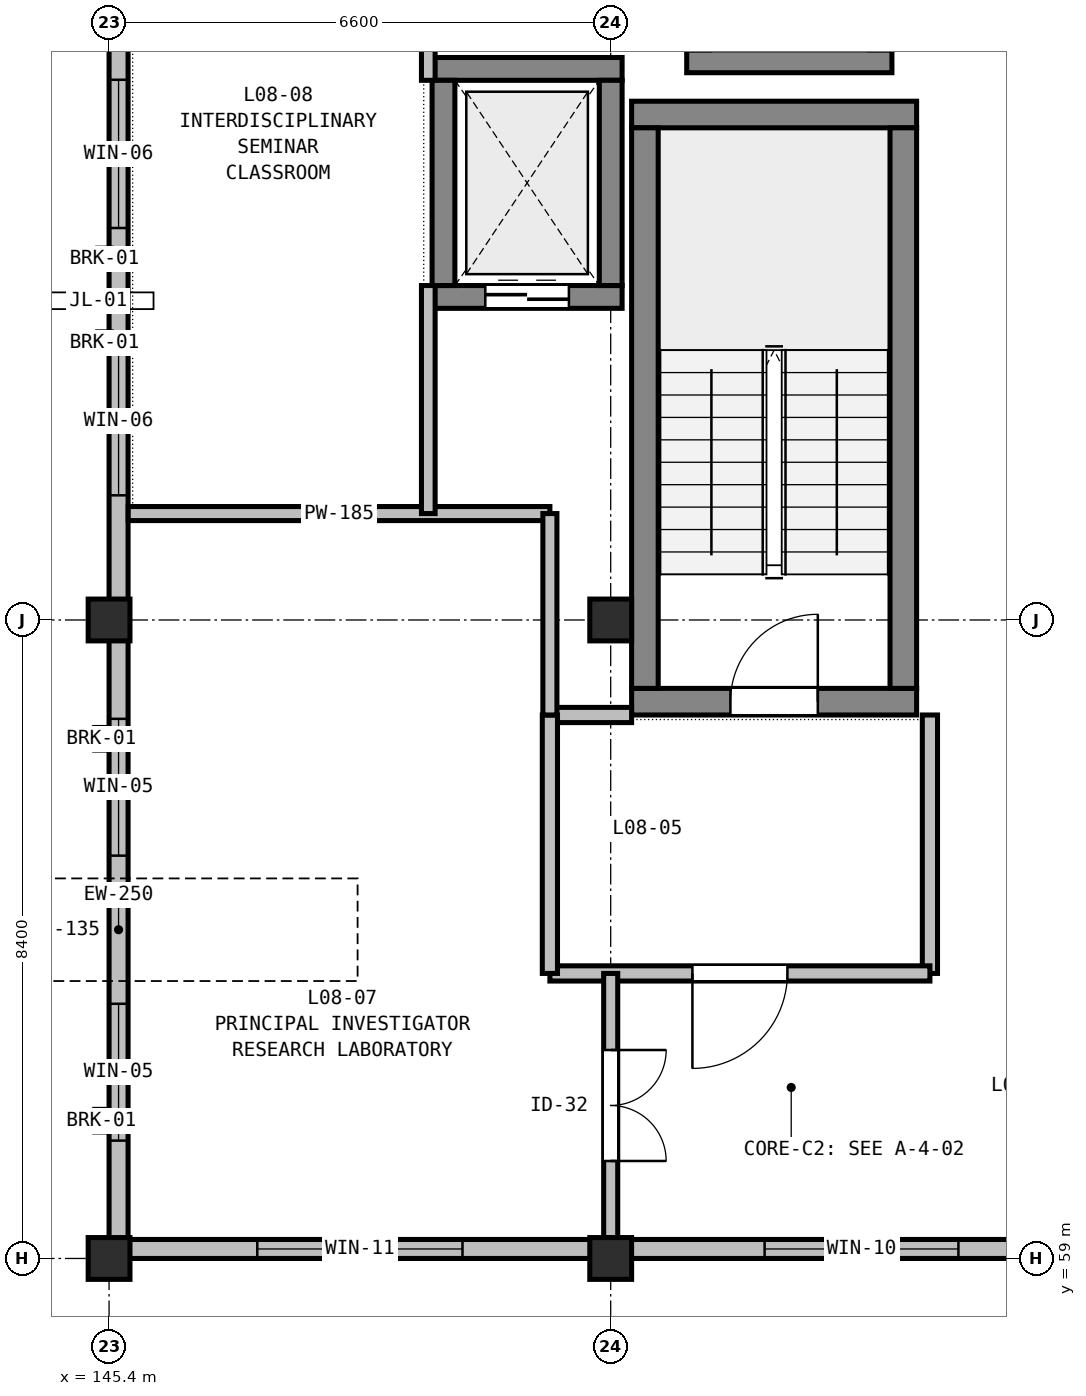
"""IFC4 building model, lengths in metres.
Left out: names, types, materials, properties, quantities, classifications, styles, units other than length and angle.
Written with IfcOpenShell. Run it as: python <this file> out.ifc"""

import sys

from ifc_helpers import new_model, si_unit, direction, frame, frame_2d, origin, origin_2d, place, context, subcontext, project, spatial, rectangle, extrude, element, fill, save


model = new_model("IFC4")
c1 = context("Model", 3, precision=1e-05, world=origin(), true_north=direction((0.0, 1.0)))
c2 = subcontext(c1, "Body", "Model", "MODEL_VIEW")
j1 = project(units=[si_unit("LENGTHUNIT", "METRE"), si_unit("PLANEANGLEUNIT", "RADIAN")], contexts=[c1])
p1 = place(None, origin())
s1 = spatial("IfcSite", under=j1, at=p1, CompositionType="ELEMENT")
p2 = place(p1, origin())
s2 = spatial("IfcBuilding", under=s1, at=p2, CompositionType="ELEMENT")
p3 = place(p2, frame((0.0, 0.0, 36.6)))
s3 = spatial("IfcBuildingStorey", under=s2, at=p3, CompositionType="ELEMENT", Elevation=36.6)
for number, where, z_axis, x_axis in (
    (1, (145.4, 59.0, 0.0), (0.0, 0.0, 1.0), (1.0, 0.0, 0.0)),
    (2, (145.4, 67.4, 0.0), (0.0, 0.0, 1.0), (1.0, 0.0, 0.0)),
    (3, (152.0, 59.0, 0.0), (0.0, 0.0, 1.0), (1.0, 0.0, 0.0)),
    (4, (152.0, 67.4, 0.0), (0.0, 0.0, 1.0), (1.0, 0.0, 0.0)),
):
    element("IfcColumn", number, at=place(p3, frame(where, z_axis=z_axis, x_axis=x_axis)), inside=s3, PredefinedType="COLUMN", context=c2, shape_type="SweptSolid", body=[
        extrude(rectangle(XDim=0.55, YDim=0.55, at=origin_2d()), origin(), (0.0, 0.0, 1.0), 3.9),
    ])
p4 = place(p3, frame((152.275, 66.325, 0.0), z_axis=(0.0, 0.0, 1.0), x_axis=(1.0, 0.0, 0.0)))
e5 = element("IfcWall", 5, at=p4, inside=s3, PredefinedType="SHEAR", context=c2, shape_type="SweptSolid", body=[
    extrude(rectangle(XDim=3.75, YDim=0.35, at=frame_2d((1.875, 0.0))), origin(), (0.0, 0.0, 1.0), 3.9),
])
p5 = place(p4, frame((1.3, 0.0, 0.0)))
e6 = element("IfcOpeningElement", 6, at=p5, cuts=e5, PredefinedType="OPENING", context=c2, shape_type="SweptSolid", body=[
    extrude(rectangle(XDim=1.15, YDim=2.15, at=frame_2d((0.575, 1.075))), frame((0.0, 0.185, 0.0), z_axis=(0.0, -1.0, 0.0), x_axis=(1.0, 0.0, 0.0)), (0.0, 0.0, 1.0), 0.37),
])
p6 = place(p3, frame((152.275, 74.05, 0.0), z_axis=(0.0, 0.0, 1.0), x_axis=(1.0, 0.0, 0.0)))
e7 = element("IfcWall", 7, at=p6, inside=s3, PredefinedType="SHEAR", context=c2, shape_type="SweptSolid", body=[
    extrude(rectangle(XDim=3.75, YDim=0.35, at=frame_2d((1.875, 0.0))), origin(), (0.0, 0.0, 1.0), 3.9),
])
for number, where, z_axis, x_axis in (
    (8, (152.45, 66.5, 0.0), (0.0, 0.0, 1.0), (0.0, 1.0, 0.0)),
    (9, (155.85, 66.5, 0.0), (0.0, 0.0, 1.0), (0.0, 1.0, 0.0)),
):
    element("IfcWall", number, at=place(p3, frame(where, z_axis=z_axis, x_axis=x_axis)), inside=s3, PredefinedType="SHEAR", context=c2, shape_type="SweptSolid", body=[
        extrude(rectangle(XDim=7.375, YDim=0.35, at=frame_2d((3.688, 0.0))), origin(), (0.0, 0.0, 1.0), 3.9),
    ])
p7 = place(p3, frame((149.65, 71.65, 0.0), z_axis=(0.0, 0.0, 1.0), x_axis=(1.0, 0.0, 0.0)))
e10 = element("IfcWall", 10, at=p7, inside=s3, PredefinedType="SHEAR", context=c2, shape_type="SweptSolid", body=[
    extrude(rectangle(XDim=2.5, YDim=0.3, at=frame_2d((1.25, 0.0))), origin(), (0.0, 0.0, 1.0), 3.9),
])
p8 = place(p7, frame((0.7, 0.0, 0.0)))
e11 = element("IfcOpeningElement", 11, at=p8, cuts=e10, PredefinedType="OPENING", context=c2, shape_type="SweptSolid", body=[
    extrude(rectangle(XDim=1.1, YDim=2.1, at=frame_2d((0.55, 1.05))), frame((0.0, 0.16, 0.0), z_axis=(0.0, -1.0, 0.0), x_axis=(1.0, 0.0, 0.0)), (0.0, 0.0, 1.0), 0.32),
])
p9 = place(p3, frame((149.65, 74.65, 0.0), z_axis=(0.0, 0.0, 1.0), x_axis=(1.0, 0.0, 0.0)))
e12 = element("IfcWall", 12, at=p9, inside=s3, PredefinedType="SHEAR", context=c2, shape_type="SweptSolid", body=[
    extrude(rectangle(XDim=2.5, YDim=0.3, at=frame_2d((1.25, 0.0))), origin(), (0.0, 0.0, 1.0), 3.9),
])
for number, where, z_axis, x_axis in (
    (13, (149.8, 71.8, 0.0), (0.0, 0.0, 1.0), (0.0, 1.0, 0.0)),
    (14, (152.0, 71.8, 0.0), (0.0, 0.0, 1.0), (0.0, 1.0, 0.0)),
    (15, (153.0, 74.75, 0.0), (0.0, 0.0, 1.0), (1.0, 0.0, 0.0)),
):
    element("IfcWall", number, at=place(p3, frame(where, z_axis=z_axis, x_axis=x_axis)), inside=s3, PredefinedType="SHEAR", context=c2, shape_type="SweptSolid", body=[
        extrude(rectangle(XDim=2.7, YDim=0.3, at=frame_2d((1.35, 0.0))), origin(), (0.0, 0.0, 1.0), 3.9),
    ])
p10 = place(p3, frame((145.525, 59.25, 0.0), z_axis=(0.0, 0.0, 1.0), x_axis=(0.0, 1.0, 0.0)))
e16 = element("IfcWall", 16, at=p10, inside=s3, PredefinedType="STANDARD", context=c2, shape_type="SweptSolid", body=[
    extrude(rectangle(XDim=8.15, YDim=0.25, at=frame_2d((4.075, 0.0))), origin(), (0.0, 0.0, 1.0), 3.285),
])
p11 = place(p10, frame((1.301, 0.0, 0.9)))
e17 = element("IfcOpeningElement", 17, at=p11, cuts=e16, PredefinedType="OPENING", context=c2, shape_type="SweptSolid", body=[
    extrude(rectangle(XDim=1.8, YDim=2.1, at=frame_2d((0.9, 1.05))), frame((0.0, 0.135, 0.0), z_axis=(0.0, -1.0, 0.0), x_axis=(1.0, 0.0, 0.0)), (0.0, 0.0, 1.0), 0.27),
])
p12 = place(p10, frame((5.05, 0.0, 0.9)))
e18 = element("IfcOpeningElement", 18, at=p12, cuts=e16, PredefinedType="OPENING", context=c2, shape_type="SweptSolid", body=[
    extrude(rectangle(XDim=1.8, YDim=2.1, at=frame_2d((0.9, 1.05))), frame((0.0, 0.135, 0.0), z_axis=(0.0, -1.0, 0.0), x_axis=(1.0, 0.0, 0.0)), (0.0, 0.0, 1.0), 0.27),
])
p13 = place(p3, frame((145.525, 67.4, 0.0), z_axis=(0.0, 0.0, 1.0), x_axis=(0.0, 1.0, 0.0)))
e19 = element("IfcWall", 19, at=p13, inside=s3, PredefinedType="STANDARD", context=c2, shape_type="SweptSolid", body=[
    extrude(rectangle(XDim=8.4, YDim=0.25, at=frame_2d((4.2, 0.0))), origin(), (0.0, 0.0, 1.0), 3.285),
])
p14 = place(p13, frame((1.64, 0.0, 0.9)))
e20 = element("IfcOpeningElement", 20, at=p14, cuts=e19, PredefinedType="OPENING", context=c2, shape_type="SweptSolid", body=[
    extrude(rectangle(XDim=1.95, YDim=2.1, at=frame_2d((0.975, 1.05))), frame((0.0, 0.135, 0.0), z_axis=(0.0, -1.0, 0.0), x_axis=(1.0, 0.0, 0.0)), (0.0, 0.0, 1.0), 0.27),
])
p15 = place(p13, frame((5.157, 0.0, 0.9)))
e21 = element("IfcOpeningElement", 21, at=p15, cuts=e19, PredefinedType="OPENING", context=c2, shape_type="SweptSolid", body=[
    extrude(rectangle(XDim=1.95, YDim=2.1, at=frame_2d((0.975, 1.05))), frame((0.0, 0.135, 0.0), z_axis=(0.0, -1.0, 0.0), x_axis=(1.0, 0.0, 0.0)), (0.0, 0.0, 1.0), 0.27),
])
p16 = place(p3, frame((158.6, 59.125, 0.0), z_axis=(0.0, 0.0, 1.0), x_axis=(-1.0, 0.0, 0.0)))
e22 = element("IfcWall", 22, at=p16, inside=s3, PredefinedType="STANDARD", context=c2, shape_type="SweptSolid", body=[
    extrude(rectangle(XDim=6.6, YDim=0.25, at=frame_2d((3.3, 0.0))), origin(), (0.0, 0.0, 1.0), 3.185),
])
p17 = place(p16, frame((2.025, 0.0, 0.75)))
e23 = element("IfcOpeningElement", 23, at=p17, cuts=e22, PredefinedType="OPENING", context=c2, shape_type="SweptSolid", body=[
    extrude(rectangle(XDim=2.55, YDim=2.15, at=frame_2d((1.275, 1.075))), frame((0.0, 0.135, 0.0), z_axis=(0.0, -1.0, 0.0), x_axis=(1.0, 0.0, 0.0)), (0.0, 0.0, 1.0), 0.27),
])
p18 = place(p3, frame((152.0, 59.125, 0.0), z_axis=(0.0, 0.0, 1.0), x_axis=(-1.0, 0.0, 0.0)))
e24 = element("IfcWall", 24, at=p18, inside=s3, PredefinedType="STANDARD", context=c2, shape_type="SweptSolid", body=[
    extrude(rectangle(XDim=6.6, YDim=0.25, at=frame_2d((3.3, 0.0))), origin(), (0.0, 0.0, 1.0), 3.185),
])
p19 = place(p18, frame((1.95, 0.0, 0.75)))
e25 = element("IfcOpeningElement", 25, at=p19, cuts=e24, PredefinedType="OPENING", context=c2, shape_type="SweptSolid", body=[
    extrude(rectangle(XDim=2.7, YDim=2.2, at=frame_2d((1.35, 1.1))), frame((0.0, 0.135, 0.0), z_axis=(0.0, -1.0, 0.0), x_axis=(1.0, 0.0, 0.0)), (0.0, 0.0, 1.0), 0.27),
])
p20 = place(p3, frame((151.2, 66.15, 0.0), z_axis=(0.0, 0.0, 1.0), x_axis=(1.0, 0.0, 0.0)))
e26 = element("IfcWall", 26, at=p20, inside=s3, PredefinedType="PARTITIONING", context=c2, shape_type="SweptSolid", body=[
    extrude(rectangle(XDim=1.075, YDim=0.2, at=frame_2d((0.538, 0.0))), origin(), (0.0, 0.0, 1.0), 3.185),
])
p21 = place(p3, frame((156.2, 66.15, 0.0), z_axis=(0.0, 0.0, 1.0), x_axis=(0.0, -1.0, 0.0)))
e27 = element("IfcWall", 27, at=p21, inside=s3, PredefinedType="PARTITIONING", context=c2, shape_type="SweptSolid", body=[
    extrude(rectangle(XDim=3.4, YDim=0.2, at=frame_2d((1.7, 0.0))), origin(), (0.0, 0.0, 1.0), 3.635),
])
p22 = place(p3, frame((156.2, 62.75, 0.0), z_axis=(0.0, 0.0, 1.0), x_axis=(-1.0, 0.0, 0.0)))
e28 = element("IfcWall", 28, at=p22, inside=s3, PredefinedType="PARTITIONING", context=c2, shape_type="SweptSolid", body=[
    extrude(rectangle(XDim=5.0, YDim=0.2, at=frame_2d((2.5, 0.0))), origin(), (0.0, 0.0, 1.0), 3.185),
])
p23 = place(p22, frame((1.875, 0.0, 0.0)))
e29 = element("IfcOpeningElement", 29, at=p23, cuts=e28, PredefinedType="OPENING", context=c2, shape_type="SweptSolid", body=[
    extrude(rectangle(XDim=1.25, YDim=2.15, at=frame_2d((0.625, 1.075))), frame((0.0, 0.11, 0.0), z_axis=(0.0, -1.0, 0.0), x_axis=(1.0, 0.0, 0.0)), (0.0, 0.0, 1.0), 0.22),
])
p24 = place(p3, frame((151.2, 62.75, 0.0), z_axis=(0.0, 0.0, 1.0), x_axis=(0.0, 1.0, 0.0)))
e30 = element("IfcWall", 30, at=p24, inside=s3, PredefinedType="PARTITIONING", context=c2, shape_type="SweptSolid", body=[
    extrude(rectangle(XDim=3.4, YDim=0.2, at=frame_2d((1.7, 0.0))), origin(), (0.0, 0.0, 1.0), 3.635),
])
p25 = place(p3, frame((145.652, 68.8, 0.0), z_axis=(0.0, 0.0, 1.0), x_axis=(1.0, 0.0, 0.0)))
e31 = element("IfcWall", 31, at=p25, inside=s3, PredefinedType="PARTITIONING", context=c2, shape_type="SweptSolid", body=[
    extrude(rectangle(XDim=5.548, YDim=0.185, at=frame_2d((2.774, 0.0))), origin(), (0.0, 0.0, 1.0), 3.335),
])
p26 = place(p3, frame((151.2, 68.8, 0.0), z_axis=(0.0, 0.0, 1.0), x_axis=(0.0, -1.0, 0.0)))
e32 = element("IfcWall", 32, at=p26, inside=s3, PredefinedType="PARTITIONING", context=c2, shape_type="SweptSolid", body=[
    extrude(rectangle(XDim=2.65, YDim=0.185, at=frame_2d((1.325, 0.0))), origin(), (0.0, 0.0, 1.0), 3.285),
])
p27 = place(p3, frame((152.0, 62.75, 0.0), z_axis=(0.0, 0.0, 1.0), x_axis=(0.0, -1.0, 0.0)))
e33 = element("IfcWall", 33, at=p27, inside=s3, PredefinedType="PARTITIONING", context=c2, shape_type="SweptSolid", body=[
    extrude(rectangle(XDim=3.475, YDim=0.185, at=frame_2d((1.738, 0.0))), origin(), (0.0, 0.0, 1.0), 3.185),
])
p28 = place(p27, frame((1.008, 0.0, 0.0)))
e34 = element("IfcOpeningElement", 34, at=p28, cuts=e33, PredefinedType="OPENING", context=c2, shape_type="SweptSolid", body=[
    extrude(rectangle(XDim=1.46, YDim=2.2, at=frame_2d((0.73, 1.1))), frame((0.0, 0.103, 0.0), z_axis=(0.0, -1.0, 0.0), x_axis=(1.0, 0.0, 0.0)), (0.0, 0.0, 1.0), 0.205),
])
p29 = place(p3, frame((149.6, 78.0, 0.0), z_axis=(0.0, 0.0, 1.0), x_axis=(0.0, -1.0, 0.0)))
e35 = element("IfcWall", 35, at=p29, inside=s3, PredefinedType="PARTITIONING", context=c2, shape_type="SweptSolid", body=[
    extrude(rectangle(XDim=3.5, YDim=0.18, at=frame_2d((1.75, 0.0))), origin(), (0.0, 0.0, 1.0), 3.285),
])
p30 = place(p3, frame((149.6, 71.8, 0.0), z_axis=(0.0, 0.0, 1.0), x_axis=(0.0, -1.0, 0.0)))
e36 = element("IfcWall", 36, at=p30, inside=s3, PredefinedType="PARTITIONING", context=c2, shape_type="SweptSolid", body=[
    extrude(rectangle(XDim=3.0, YDim=0.18, at=frame_2d((1.5, 0.0))), origin(), (0.0, 0.0, 1.0), 3.635),
])
p31 = place(p11, origin())
e37 = element("IfcWindow", 37, at=p31, inside=s3, PartitioningType="SINGLE_PANEL", PredefinedType="WINDOW", context=c2, shape_type="SweptSolid", body=[
    extrude(rectangle(XDim=1.8, YDim=2.1, at=frame_2d((0.9, 1.05))), frame((0.0, 0.03, 0.0), z_axis=(0.0, -1.0, 0.0), x_axis=(1.0, 0.0, 0.0)), (0.0, 0.0, 1.0), 0.06),
])
fill(e17, e37)
p32 = place(p12, origin())
e38 = element("IfcWindow", 38, at=p32, inside=s3, PartitioningType="SINGLE_PANEL", PredefinedType="WINDOW", context=c2, shape_type="SweptSolid", body=[
    extrude(rectangle(XDim=1.8, YDim=2.1, at=frame_2d((0.9, 1.05))), frame((0.0, 0.03, 0.0), z_axis=(0.0, -1.0, 0.0), x_axis=(1.0, 0.0, 0.0)), (0.0, 0.0, 1.0), 0.06),
])
fill(e18, e38)
p33 = place(p14, origin())
e39 = element("IfcWindow", 39, at=p33, inside=s3, PartitioningType="SINGLE_PANEL", PredefinedType="WINDOW", context=c2, shape_type="SweptSolid", body=[
    extrude(rectangle(XDim=1.95, YDim=2.1, at=frame_2d((0.975, 1.05))), frame((0.0, 0.03, 0.0), z_axis=(0.0, -1.0, 0.0), x_axis=(1.0, 0.0, 0.0)), (0.0, 0.0, 1.0), 0.06),
])
fill(e20, e39)
p34 = place(p15, origin())
e40 = element("IfcWindow", 40, at=p34, inside=s3, PartitioningType="SINGLE_PANEL", PredefinedType="WINDOW", context=c2, shape_type="SweptSolid", body=[
    extrude(rectangle(XDim=1.95, YDim=2.1, at=frame_2d((0.975, 1.05))), frame((0.0, 0.03, 0.0), z_axis=(0.0, -1.0, 0.0), x_axis=(1.0, 0.0, 0.0)), (0.0, 0.0, 1.0), 0.06),
])
fill(e21, e40)
p35 = place(p17, origin())
e41 = element("IfcWindow", 41, at=p35, inside=s3, PartitioningType="SINGLE_PANEL", PredefinedType="WINDOW", context=c2, shape_type="SweptSolid", body=[
    extrude(rectangle(XDim=2.55, YDim=2.15, at=frame_2d((1.275, 1.075))), frame((0.0, 0.03, 0.0), z_axis=(0.0, -1.0, 0.0), x_axis=(1.0, 0.0, 0.0)), (0.0, 0.0, 1.0), 0.06),
])
fill(e23, e41)
p36 = place(p19, origin())
e42 = element("IfcWindow", 42, at=p36, inside=s3, PartitioningType="SINGLE_PANEL", PredefinedType="WINDOW", context=c2, shape_type="SweptSolid", body=[
    extrude(rectangle(XDim=2.7, YDim=2.2, at=frame_2d((1.35, 1.1))), frame((0.0, 0.03, 0.0), z_axis=(0.0, -1.0, 0.0), x_axis=(1.0, 0.0, 0.0)), (0.0, 0.0, 1.0), 0.06),
])
fill(e25, e42)
p37 = place(p5, origin())
e43 = element("IfcDoor", 43, at=p37, inside=s3, OperationType="SINGLE_SWING_RIGHT", PredefinedType="DOOR", context=c2, shape_type="SweptSolid", body=[
    extrude(rectangle(XDim=1.15, YDim=2.15, at=frame_2d((0.575, 1.075))), frame((0.0, 0.025, 0.0), z_axis=(0.0, -1.0, 0.0), x_axis=(1.0, 0.0, 0.0)), (0.0, 0.0, 1.0), 0.05),
])
fill(e6, e43)
p38 = place(p8, origin())
e44 = element("IfcDoor", 44, at=p38, inside=s3, OperationType="DOUBLE_DOOR_SLIDING", PredefinedType="DOOR", context=c2, shape_type="SweptSolid", body=[
    extrude(rectangle(XDim=1.1, YDim=2.1, at=frame_2d((0.55, 1.05))), frame((0.0, 0.025, 0.0), z_axis=(0.0, -1.0, 0.0), x_axis=(1.0, 0.0, 0.0)), (0.0, 0.0, 1.0), 0.05),
])
fill(e11, e44)
p39 = place(p23, origin())
e45 = element("IfcDoor", 45, at=p39, inside=s3, OperationType="SINGLE_SWING_RIGHT", PredefinedType="DOOR", context=c2, shape_type="SweptSolid", body=[
    extrude(rectangle(XDim=1.25, YDim=2.15, at=frame_2d((0.625, 1.075))), frame((0.0, 0.025, 0.0), z_axis=(0.0, -1.0, 0.0), x_axis=(1.0, 0.0, 0.0)), (0.0, 0.0, 1.0), 0.05),
])
fill(e29, e45)
p40 = place(p28, origin())
e46 = element("IfcDoor", 46, at=p40, inside=s3, OperationType="DOUBLE_DOOR_SINGLE_SWING", PredefinedType="DOOR", context=c2, shape_type="SweptSolid", body=[
    extrude(rectangle(XDim=1.46, YDim=2.2, at=frame_2d((0.73, 1.1))), frame((0.0, 0.025, 0.0), z_axis=(0.0, -1.0, 0.0), x_axis=(1.0, 0.0, 0.0)), (0.0, 0.0, 1.0), 0.05),
])
fill(e34, e46)
save(model, sys.argv[1])
